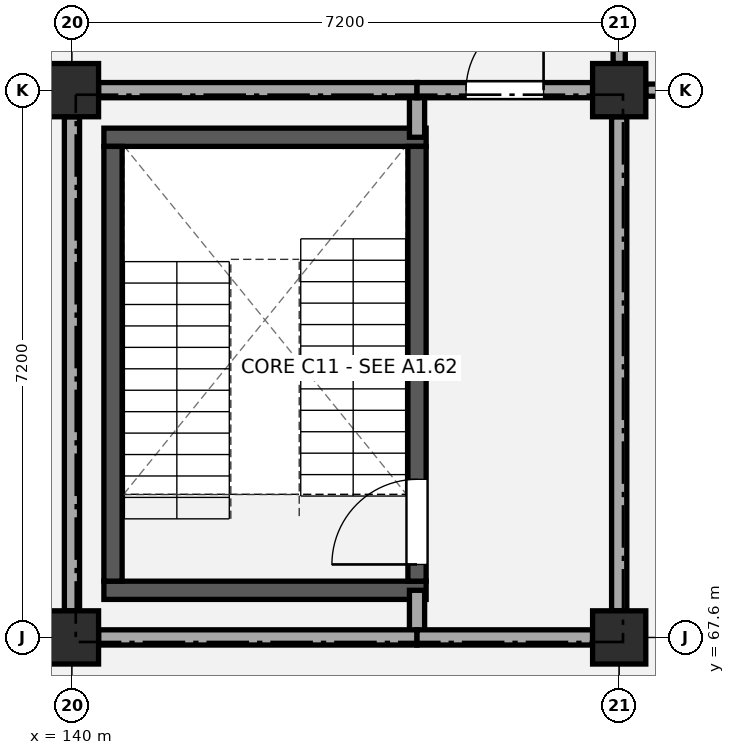
"""IFC4 building model, lengths in metres.
Left out: names, types, materials, properties, quantities, classifications, styles, units other than length and angle.
Written with IfcOpenShell. Run it as: python <this file> out.ifc"""

import sys

from ifc_helpers import new_model, si_unit, direction, frame, frame_2d, origin, origin_2d, place, context, subcontext, project, spatial, rectangle, extrude, element, fill, save


model = new_model("IFC4")
c1 = context("Model", 3, precision=1e-05, world=origin(), true_north=direction((0.0, 1.0)))
c2 = subcontext(c1, "Body", "Model", "MODEL_VIEW")
j1 = project(units=[si_unit("LENGTHUNIT", "METRE"), si_unit("PLANEANGLEUNIT", "RADIAN")], contexts=[c1])
p1 = place(None, origin())
s1 = spatial("IfcSite", under=j1, at=p1, CompositionType="ELEMENT")
p2 = place(p1, origin())
s2 = spatial("IfcBuilding", under=s1, at=p2, CompositionType="ELEMENT")
p3 = place(p2, frame((0.0, 0.0, 9.18)))
s3 = spatial("IfcBuildingStorey", under=s2, at=p3, CompositionType="ELEMENT", Elevation=9.18)
for number, where, z_axis, x_axis in (
    (1, (140.0, 67.6, 0.0), (0.0, 0.0, 1.0), (1.0, 0.0, 0.0)),
    (2, (140.0, 74.8, 0.0), (0.0, 0.0, 1.0), (1.0, 0.0, 0.0)),
    (3, (147.2, 67.6, 0.0), (0.0, 0.0, 1.0), (1.0, 0.0, 0.0)),
    (4, (147.2, 74.8, 0.0), (0.0, 0.0, 1.0), (1.0, 0.0, 0.0)),
):
    element("IfcColumn", number, at=place(p3, frame(where, z_axis=z_axis, x_axis=x_axis)), inside=s3, PredefinedType="COLUMN", context=c2, shape_type="SweptSolid", body=[
        extrude(rectangle(XDim=0.7, YDim=0.7, at=origin_2d()), origin(), (0.0, 0.0, 1.0), 4.32),
    ])
for number, where, z_axis, x_axis in (
    (5, (140.42, 68.22, 0.0), (0.0, 0.0, 1.0), (1.0, 0.0, 0.0)),
    (6, (140.42, 74.18, 0.0), (0.0, 0.0, 1.0), (1.0, 0.0, 0.0)),
):
    element("IfcWall", number, at=place(p3, frame(where, z_axis=z_axis, x_axis=x_axis)), inside=s3, PredefinedType="SHEAR", context=c2, shape_type="SweptSolid", body=[
        extrude(rectangle(XDim=4.24, YDim=0.24, at=frame_2d((2.12, 0.0))), origin(), (0.0, 0.0, 1.0), 4.02),
    ])
p4 = place(p3, frame((140.54, 68.34, 0.0), z_axis=(0.0, 0.0, 1.0), x_axis=(0.0, 1.0, 0.0)))
e7 = element("IfcWall", 7, at=p4, inside=s3, PredefinedType="SHEAR", context=c2, shape_type="SweptSolid", body=[
    extrude(rectangle(XDim=5.72, YDim=0.24, at=frame_2d((2.86, 0.0))), origin(), (0.0, 0.0, 1.0), 4.02),
])
p5 = place(p3, frame((144.54, 68.34, 0.0), z_axis=(0.0, 0.0, 1.0), x_axis=(0.0, 1.0, 0.0)))
e8 = element("IfcWall", 8, at=p5, inside=s3, PredefinedType="SHEAR", context=c2, shape_type="SweptSolid", body=[
    extrude(rectangle(XDim=5.72, YDim=0.24, at=frame_2d((2.86, 0.0))), origin(), (0.0, 0.0, 1.0), 4.02),
])
p6 = place(p5, frame((0.22, 0.0, 0.0)))
e9 = element("IfcOpeningElement", 9, at=p6, cuts=e8, PredefinedType="OPENING", context=c2, shape_type="SweptSolid", body=[
    extrude(rectangle(XDim=1.12, YDim=2.15, at=frame_2d((0.56, 1.075))), frame((0.0, 0.13, 0.0), z_axis=(0.0, -1.0, 0.0), x_axis=(1.0, 0.0, 0.0)), (0.0, 0.0, 1.0), 0.26),
])
p7 = place(p3, frame((144.54, 67.6, 0.0), z_axis=(0.0, 0.0, 1.0), x_axis=(0.0, 1.0, 0.0)))
e10 = element("IfcWall", 10, at=p7, inside=s3, PredefinedType="PARTITIONING", context=c2, shape_type="SweptSolid", body=[
    extrude(rectangle(XDim=0.62, YDim=0.2, at=frame_2d((0.31, 0.0))), origin(), (0.0, 0.0, 1.0), 3.36),
])
p8 = place(p3, frame((144.54, 74.18, 0.0), z_axis=(0.0, 0.0, 1.0), x_axis=(0.0, 1.0, 0.0)))
e11 = element("IfcWall", 11, at=p8, inside=s3, PredefinedType="PARTITIONING", context=c2, shape_type="SweptSolid", body=[
    extrude(rectangle(XDim=0.62, YDim=0.2, at=frame_2d((0.31, 0.0))), origin(), (0.0, 0.0, 1.0), 3.41),
])
for number, where, z_axis, x_axis in (
    (12, (140.0, 67.95, 0.0), (0.0, 0.0, 1.0), (0.0, 1.0, 0.0)),
    (13, (147.2, 67.95, 0.0), (0.0, 0.0, 1.0), (0.0, 1.0, 0.0)),
):
    element("IfcWall", number, at=place(p3, frame(where, z_axis=z_axis, x_axis=x_axis)), inside=s3, PredefinedType="PARTITIONING", context=c2, shape_type="SweptSolid", body=[
        extrude(rectangle(XDim=6.5, YDim=0.2, at=frame_2d((3.25, 0.0))), origin(), (0.0, 0.0, 1.0), 3.41),
    ])
p9 = place(p3, frame((140.35, 67.6, 0.0), z_axis=(0.0, 0.0, 1.0), x_axis=(1.0, 0.0, 0.0)))
e14 = element("IfcWall", 14, at=p9, inside=s3, PredefinedType="PARTITIONING", context=c2, shape_type="SweptSolid", body=[
    extrude(rectangle(XDim=4.19, YDim=0.2, at=frame_2d((2.095, 0.0))), origin(), (0.0, 0.0, 1.0), 3.36),
])
p10 = place(p3, frame((144.54, 67.6, 0.0), z_axis=(0.0, 0.0, 1.0), x_axis=(1.0, 0.0, 0.0)))
e15 = element("IfcWall", 15, at=p10, inside=s3, PredefinedType="PARTITIONING", context=c2, shape_type="SweptSolid", body=[
    extrude(rectangle(XDim=2.31, YDim=0.2, at=frame_2d((1.155, 0.0))), origin(), (0.0, 0.0, 1.0), 3.36),
])
p11 = place(p3, frame((140.35, 74.8, 0.0), z_axis=(0.0, 0.0, 1.0), x_axis=(1.0, 0.0, 0.0)))
e16 = element("IfcWall", 16, at=p11, inside=s3, PredefinedType="PARTITIONING", context=c2, shape_type="SweptSolid", body=[
    extrude(rectangle(XDim=4.19, YDim=0.2, at=frame_2d((2.095, 0.0))), origin(), (0.0, 0.0, 1.0), 3.41),
])
p12 = place(p3, frame((144.54, 74.8, 0.0), z_axis=(0.0, 0.0, 1.0), x_axis=(1.0, 0.0, 0.0)))
e17 = element("IfcWall", 17, at=p12, inside=s3, PredefinedType="PARTITIONING", context=c2, shape_type="SweptSolid", body=[
    extrude(rectangle(XDim=2.31, YDim=0.2, at=frame_2d((1.155, 0.0))), origin(), (0.0, 0.0, 1.0), 3.41),
])
p13 = place(p12, frame((0.645, 0.0, 0.0)))
e18 = element("IfcOpeningElement", 18, at=p13, cuts=e17, PredefinedType="OPENING", context=c2, shape_type="SweptSolid", body=[
    extrude(rectangle(XDim=1.02, YDim=2.15, at=frame_2d((0.51, 1.075))), frame((0.0, 0.11, 0.0), z_axis=(0.0, -1.0, 0.0), x_axis=(1.0, 0.0, 0.0)), (0.0, 0.0, 1.0), 0.22),
])
p14 = place(p3, frame((147.2, 75.15, 0.0), z_axis=(0.0, 0.0, 1.0), x_axis=(0.0, 1.0, 0.0)))
e19 = element("IfcWall", 19, at=p14, inside=s3, PredefinedType="PARTITIONING", context=c2, shape_type="SweptSolid", body=[
    extrude(rectangle(XDim=6.5, YDim=0.16, at=frame_2d((3.25, 0.0))), origin(), (0.0, 0.0, 1.0), 3.38),
])
p15 = place(p3, frame((147.55, 74.8, 0.0), z_axis=(0.0, 0.0, 1.0), x_axis=(1.0, 0.0, 0.0)))
e20 = element("IfcWall", 20, at=p15, inside=s3, PredefinedType="PARTITIONING", context=c2, shape_type="SweptSolid", body=[
    extrude(rectangle(XDim=6.5, YDim=0.16, at=frame_2d((3.25, 0.0))), origin(), (0.0, 0.0, 1.0), 3.38),
])
p16 = place(p15, frame((2.61, 0.0, 0.0)))
e21 = element("IfcOpeningElement", 21, at=p16, cuts=e20, PredefinedType="OPENING", context=c2, shape_type="SweptSolid", body=[
    extrude(rectangle(XDim=1.28, YDim=2.2, at=frame_2d((0.64, 1.1))), frame((0.0, 0.09, 0.0), z_axis=(0.0, -1.0, 0.0), x_axis=(1.0, 0.0, 0.0)), (0.0, 0.0, 1.0), 0.18),
])
p17 = place(p6, origin())
e22 = element("IfcDoor", 22, at=p17, inside=s3, OperationType="SINGLE_SWING_LEFT", PredefinedType="DOOR", context=c2, shape_type="SweptSolid", body=[
    extrude(rectangle(XDim=1.12, YDim=2.15, at=frame_2d((0.56, 1.075))), frame((0.0, 0.025, 0.0), z_axis=(0.0, -1.0, 0.0), x_axis=(1.0, 0.0, 0.0)), (0.0, 0.0, 1.0), 0.05),
])
fill(e9, e22)
p18 = place(p13, origin())
e23 = element("IfcDoor", 23, at=p18, inside=s3, OperationType="SINGLE_SWING_RIGHT", PredefinedType="DOOR", context=c2, shape_type="SweptSolid", body=[
    extrude(rectangle(XDim=1.02, YDim=2.15, at=frame_2d((0.51, 1.075))), frame((0.0, 0.025, 0.0), z_axis=(0.0, -1.0, 0.0), x_axis=(1.0, 0.0, 0.0)), (0.0, 0.0, 1.0), 0.05),
])
fill(e18, e23)
save(model, sys.argv[1])
